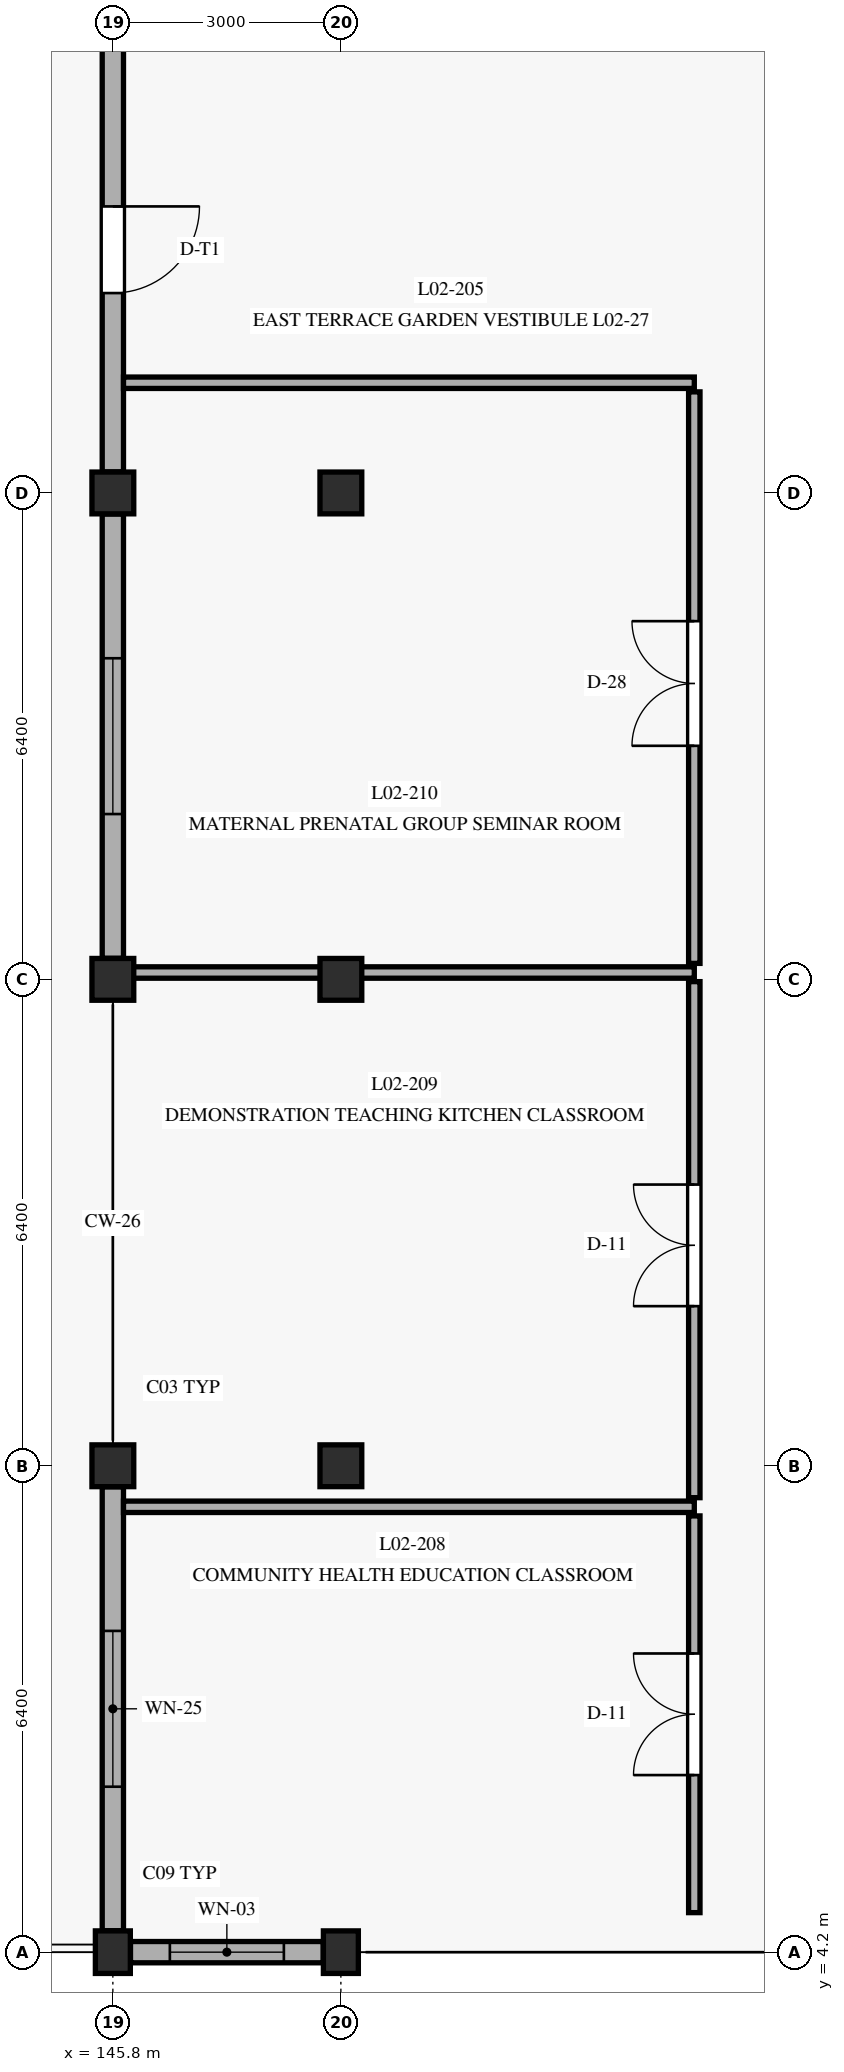
"""IFC4 building model, lengths in metres.
Left out: names, types, materials, properties, quantities, classifications, styles, units other than length and angle.
Written with IfcOpenShell. Run it as: python <this file> out.ifc"""

import sys

from ifc_helpers import new_model, si_unit, direction, frame, frame_2d, origin, origin_with_axes, origin_2d, place, context, subcontext, project, spatial, rectangle, extrude, element, fill, save


model = new_model("IFC4")
c1 = context("Model", 3, precision=1e-05, world=origin(), true_north=direction((0.0, 1.0)))
c2 = subcontext(c1, "Body", "Model", "MODEL_VIEW")
j1 = project(units=[si_unit("LENGTHUNIT", "METRE"), si_unit("PLANEANGLEUNIT", "RADIAN")], contexts=[c1])
p1 = place(None, origin())
s1 = spatial("IfcSite", under=j1, at=p1, CompositionType="ELEMENT")
p2 = place(p1, origin())
s2 = spatial("IfcBuilding", under=s1, at=p2, CompositionType="ELEMENT")
p3 = place(p2, frame((0.0, 0.0, 4.8)))
s3 = spatial("IfcBuildingStorey", under=s2, at=p3, CompositionType="ELEMENT", Elevation=4.8)
p4 = place(p3, frame((145.8, 4.2, 0.0), z_axis=(0.0, 0.0, 1.0), x_axis=(1.0, 0.0, 0.0)))
e1 = element("IfcColumn", 1, at=p4, inside=s3, PredefinedType="COLUMN", context=c2, shape_type="SweptSolid", body=[
    extrude(rectangle(XDim=0.46, YDim=0.56, at=origin_2d()), origin(), (0.0, 0.0, 1.0), 4.5),
])
for number, where, z_axis, x_axis in (
    (2, (145.8, 10.6, 0.0), (0.0, 0.0, 1.0), (1.0, 0.0, 0.0)),
    (3, (145.8, 17.0, 0.0), (0.0, 0.0, 1.0), (1.0, 0.0, 0.0)),
    (4, (145.8, 23.4, 0.0), (0.0, 0.0, 1.0), (1.0, 0.0, 0.0)),
):
    element("IfcColumn", number, at=place(p3, frame(where, z_axis=z_axis, x_axis=x_axis)), inside=s3, PredefinedType="COLUMN", context=c2, shape_type="SweptSolid", body=[
        extrude(rectangle(XDim=0.55, YDim=0.55, at=origin_2d()), origin(), (0.0, 0.0, 1.0), 4.5),
    ])
p5 = place(p3, frame((148.8, 4.2, 0.0), z_axis=(0.0, 0.0, 1.0), x_axis=(1.0, 0.0, 0.0)))
e5 = element("IfcColumn", 5, at=p5, inside=s3, PredefinedType="COLUMN", context=c2, shape_type="SweptSolid", body=[
    extrude(rectangle(XDim=0.46, YDim=0.56, at=origin_2d()), origin(), (0.0, 0.0, 1.0), 4.5),
])
for number, where, z_axis, x_axis in (
    (6, (148.8, 10.6, 0.0), (0.0, 0.0, 1.0), (1.0, 0.0, 0.0)),
    (7, (148.8, 17.0, 0.0), (0.0, 0.0, 1.0), (1.0, 0.0, 0.0)),
    (8, (148.8, 23.4, 0.0), (0.0, 0.0, 1.0), (1.0, 0.0, 0.0)),
):
    element("IfcColumn", number, at=place(p3, frame(where, z_axis=z_axis, x_axis=x_axis)), inside=s3, PredefinedType="COLUMN", context=c2, shape_type="SweptSolid", body=[
        extrude(rectangle(XDim=0.55, YDim=0.55, at=origin_2d()), origin(), (0.0, 0.0, 1.0), 4.5),
    ])
p6 = place(p3, frame((145.8, 10.323, 0.0), z_axis=(0.0, 0.0, 1.0), x_axis=(0.0, -1.0, 0.0)))
e9 = element("IfcWall", 9, at=p6, inside=s3, PredefinedType="SOLIDWALL", context=c2, shape_type="SweptSolid", body=[
    extrude(rectangle(XDim=5.841, YDim=0.28, at=frame_2d((2.92, 0.0))), origin(), (0.0, 0.0, 1.0), 3.79),
])
p7 = place(p6, frame((1.896, 0.0, 0.8)))
e10 = element("IfcOpeningElement", 10, at=p7, cuts=e9, PredefinedType="OPENING", context=c2, shape_type="SweptSolid", body=[
    extrude(rectangle(XDim=2.05, YDim=1.95, at=frame_2d((1.025, 0.975))), frame((0.0, 0.15, 0.0), z_axis=(0.0, -1.0, 0.0), x_axis=(1.0, 0.0, 0.0)), (0.0, 0.0, 1.0), 0.3),
])
p8 = place(p3, frame((145.8, 23.123, 0.0), z_axis=(0.0, 0.0, 1.0), x_axis=(0.0, -1.0, 0.0)))
e11 = element("IfcWall", 11, at=p8, inside=s3, PredefinedType="SOLIDWALL", context=c2, shape_type="SweptSolid", body=[
    extrude(rectangle(XDim=5.846, YDim=0.28, at=frame_2d((2.923, 0.0))), origin(), (0.0, 0.0, 1.0), 3.79),
])
p9 = place(p8, frame((1.898, 0.0, 0.8)))
e12 = element("IfcOpeningElement", 12, at=p9, cuts=e11, PredefinedType="OPENING", context=c2, shape_type="SweptSolid", body=[
    extrude(rectangle(XDim=2.05, YDim=1.95, at=frame_2d((1.025, 0.975))), frame((0.0, 0.15, 0.0), z_axis=(0.0, -1.0, 0.0), x_axis=(1.0, 0.0, 0.0)), (0.0, 0.0, 1.0), 0.3),
])
p10 = place(p3, frame((145.8, 29.523, 0.0), z_axis=(0.0, 0.0, 1.0), x_axis=(0.0, -1.0, 0.0)))
e13 = element("IfcWall", 13, at=p10, inside=s3, PredefinedType="SOLIDWALL", context=c2, shape_type="SweptSolid", body=[
    extrude(rectangle(XDim=5.846, YDim=0.28, at=frame_2d((2.923, 0.0))), origin(), (0.0, 0.0, 1.0), 3.79),
])
p11 = place(p10, frame((2.353, 0.0, 0.0)))
e14 = element("IfcOpeningElement", 14, at=p11, cuts=e13, PredefinedType="OPENING", context=c2, shape_type="SweptSolid", body=[
    extrude(rectangle(XDim=1.14, YDim=2.3, at=frame_2d((0.57, 1.15))), frame((0.0, 0.15, 0.0), z_axis=(0.0, -1.0, 0.0), x_axis=(1.0, 0.0, 0.0)), (0.0, 0.0, 1.0), 0.3),
])
p12 = place(p3, frame((146.032, 4.2, 0.0), z_axis=(0.0, 0.0, 1.0), x_axis=(1.0, 0.0, 0.0)))
e15 = element("IfcWall", 15, at=p12, inside=s3, PredefinedType="SOLIDWALL", context=c2, shape_type="SweptSolid", body=[
    extrude(rectangle(XDim=2.536, YDim=0.28, at=frame_2d((1.268, 0.0))), origin(), (0.0, 0.0, 1.0), 3.75),
])
p13 = place(p12, frame((0.518, 0.0, 0.9)))
e16 = element("IfcOpeningElement", 16, at=p13, cuts=e15, PredefinedType="OPENING", context=c2, shape_type="SweptSolid", body=[
    extrude(rectangle(XDim=1.5, YDim=2.2, at=frame_2d((0.75, 1.1))), frame((0.0, 0.15, 0.0), z_axis=(0.0, -1.0, 0.0), x_axis=(1.0, 0.0, 0.0)), (0.0, 0.0, 1.0), 0.3),
])
p14 = place(p3, frame((153.45, 4.72, 0.0), z_axis=(0.0, 0.0, 1.0), x_axis=(0.0, 1.0, 0.0)))
e17 = element("IfcWall", 17, at=p14, inside=s3, PredefinedType="PARTITIONING", context=c2, shape_type="SweptSolid", body=[
    extrude(rectangle(XDim=5.22, YDim=0.15, at=frame_2d((2.61, 0.0))), origin(), (0.0, 0.0, 1.0), 4.195),
])
p15 = place(p14, frame((1.81, 0.0, 0.0)))
e18 = element("IfcOpeningElement", 18, at=p15, cuts=e17, PredefinedType="OPENING", context=c2, shape_type="SweptSolid", body=[
    extrude(rectangle(XDim=1.6, YDim=2.25, at=frame_2d((0.8, 1.125))), frame((0.0, 0.085, 0.0), z_axis=(0.0, -1.0, 0.0), x_axis=(1.0, 0.0, 0.0)), (0.0, 0.0, 1.0), 0.17),
])
p16 = place(p3, frame((145.94, 10.06, 0.0), z_axis=(0.0, 0.0, 1.0), x_axis=(1.0, 0.0, 0.0)))
e19 = element("IfcWall", 19, at=p16, inside=s3, PredefinedType="PARTITIONING", context=c2, shape_type="SweptSolid", body=[
    extrude(rectangle(XDim=7.51, YDim=0.15, at=frame_2d((3.755, 0.0))), origin(), (0.0, 0.0, 1.0), 3.785),
])
p17 = place(p3, frame((153.45, 10.18, 0.0), z_axis=(0.0, 0.0, 1.0), x_axis=(0.0, 1.0, 0.0)))
e20 = element("IfcWall", 20, at=p17, inside=s3, PredefinedType="PARTITIONING", context=c2, shape_type="SweptSolid", body=[
    extrude(rectangle(XDim=6.79, YDim=0.15, at=frame_2d((3.395, 0.0))), origin(), (0.0, 0.0, 1.0), 3.795),
])
p18 = place(p17, frame((2.52, 0.0, 0.0)))
e21 = element("IfcOpeningElement", 21, at=p18, cuts=e20, PredefinedType="OPENING", context=c2, shape_type="SweptSolid", body=[
    extrude(rectangle(XDim=1.6, YDim=2.25, at=frame_2d((0.8, 1.125))), frame((0.0, 0.085, 0.0), z_axis=(0.0, -1.0, 0.0), x_axis=(1.0, 0.0, 0.0)), (0.0, 0.0, 1.0), 0.17),
])
p19 = place(p3, frame((145.94, 17.09, 0.0), z_axis=(0.0, 0.0, 1.0), x_axis=(1.0, 0.0, 0.0)))
e22 = element("IfcWall", 22, at=p19, inside=s3, PredefinedType="PARTITIONING", context=c2, shape_type="SweptSolid", body=[
    extrude(rectangle(XDim=7.51, YDim=0.15, at=frame_2d((3.755, 0.0))), origin(), (0.0, 0.0, 1.0), 3.795),
])
p20 = place(p3, frame((153.45, 17.21, 0.0), z_axis=(0.0, 0.0, 1.0), x_axis=(0.0, 1.0, 0.0)))
e23 = element("IfcWall", 23, at=p20, inside=s3, PredefinedType="PARTITIONING", context=c2, shape_type="SweptSolid", body=[
    extrude(rectangle(XDim=7.52, YDim=0.15, at=frame_2d((3.76, 0.0))), origin(), (0.0, 0.0, 1.0), 3.545),
])
p21 = place(p20, frame((2.863, 0.0, 0.0)))
e24 = element("IfcOpeningElement", 24, at=p21, cuts=e23, PredefinedType="OPENING", context=c2, shape_type="SweptSolid", body=[
    extrude(rectangle(XDim=1.64, YDim=2.32, at=frame_2d((0.82, 1.16))), frame((0.0, 0.085, 0.0), z_axis=(0.0, -1.0, 0.0), x_axis=(1.0, 0.0, 0.0)), (0.0, 0.0, 1.0), 0.17),
])
p22 = place(p3, frame((145.94, 24.85, 0.0), z_axis=(0.0, 0.0, 1.0), x_axis=(1.0, 0.0, 0.0)))
e25 = element("IfcWall", 25, at=p22, inside=s3, PredefinedType="PARTITIONING", context=c2, shape_type="SweptSolid", body=[
    extrude(rectangle(XDim=7.51, YDim=0.15, at=frame_2d((3.755, 0.0))), origin(), (0.0, 0.0, 1.0), 3.785),
])
p23 = place(p7, origin_with_axes())
e26 = element("IfcWindow", 26, at=p23, inside=s3, PartitioningType="SINGLE_PANEL", PredefinedType="WINDOW", context=c2, shape_type="SweptSolid", body=[
    extrude(rectangle(XDim=2.05, YDim=1.95, at=frame_2d((1.025, 0.975))), frame((0.0, 0.03, 0.0), z_axis=(0.0, -1.0, 0.0), x_axis=(1.0, 0.0, 0.0)), (0.0, 0.0, 1.0), 0.06),
])
fill(e10, e26)
p24 = place(p9, origin_with_axes())
e27 = element("IfcWindow", 27, at=p24, inside=s3, PartitioningType="SINGLE_PANEL", PredefinedType="WINDOW", context=c2, shape_type="SweptSolid", body=[
    extrude(rectangle(XDim=2.05, YDim=1.95, at=frame_2d((1.025, 0.975))), frame((0.0, 0.03, 0.0), z_axis=(0.0, -1.0, 0.0), x_axis=(1.0, 0.0, 0.0)), (0.0, 0.0, 1.0), 0.06),
])
fill(e12, e27)
p25 = place(p11, frame((1.14, 0.0, 0.0), z_axis=(0.0, 0.0, 1.0), x_axis=(-1.0, 0.0, 0.0)))
e28 = element("IfcDoor", 28, at=p25, inside=s3, OperationType="SINGLE_SWING_RIGHT", PredefinedType="DOOR", context=c2, shape_type="SweptSolid", body=[
    extrude(rectangle(XDim=1.14, YDim=2.3, at=frame_2d((0.57, 1.15))), frame((0.0, 0.025, 0.0), z_axis=(0.0, -1.0, 0.0), x_axis=(1.0, 0.0, 0.0)), (0.0, 0.0, 1.0), 0.05),
])
fill(e14, e28)
p26 = place(p13, origin_with_axes())
e29 = element("IfcWindow", 29, at=p26, inside=s3, PartitioningType="SINGLE_PANEL", PredefinedType="WINDOW", context=c2, shape_type="SweptSolid", body=[
    extrude(rectangle(XDim=1.5, YDim=2.2, at=frame_2d((0.75, 1.1))), frame((0.0, 0.03, 0.0), z_axis=(0.0, -1.0, 0.0), x_axis=(1.0, 0.0, 0.0)), (0.0, 0.0, 1.0), 0.06),
])
fill(e16, e29)
p27 = place(p15, origin_with_axes())
e30 = element("IfcDoor", 30, at=p27, inside=s3, OperationType="DOUBLE_DOOR_SINGLE_SWING", PredefinedType="DOOR", context=c2, shape_type="SweptSolid", body=[
    extrude(rectangle(XDim=1.6, YDim=2.25, at=frame_2d((0.8, 1.125))), frame((0.0, 0.025, 0.0), z_axis=(0.0, -1.0, 0.0), x_axis=(1.0, 0.0, 0.0)), (0.0, 0.0, 1.0), 0.05),
])
fill(e18, e30)
p28 = place(p18, origin_with_axes())
e31 = element("IfcDoor", 31, at=p28, inside=s3, OperationType="DOUBLE_DOOR_SINGLE_SWING", PredefinedType="DOOR", context=c2, shape_type="SweptSolid", body=[
    extrude(rectangle(XDim=1.6, YDim=2.25, at=frame_2d((0.8, 1.125))), frame((0.0, 0.025, 0.0), z_axis=(0.0, -1.0, 0.0), x_axis=(1.0, 0.0, 0.0)), (0.0, 0.0, 1.0), 0.05),
])
fill(e21, e31)
p29 = place(p21, origin_with_axes())
e32 = element("IfcDoor", 32, at=p29, inside=s3, OperationType="DOUBLE_DOOR_SINGLE_SWING", PredefinedType="DOOR", context=c2, shape_type="SweptSolid", body=[
    extrude(rectangle(XDim=1.64, YDim=2.32, at=frame_2d((0.82, 1.16))), frame((0.0, 0.025, 0.0), z_axis=(0.0, -1.0, 0.0), x_axis=(1.0, 0.0, 0.0)), (0.0, 0.0, 1.0), 0.05),
])
fill(e24, e32)
save(model, sys.argv[1])
